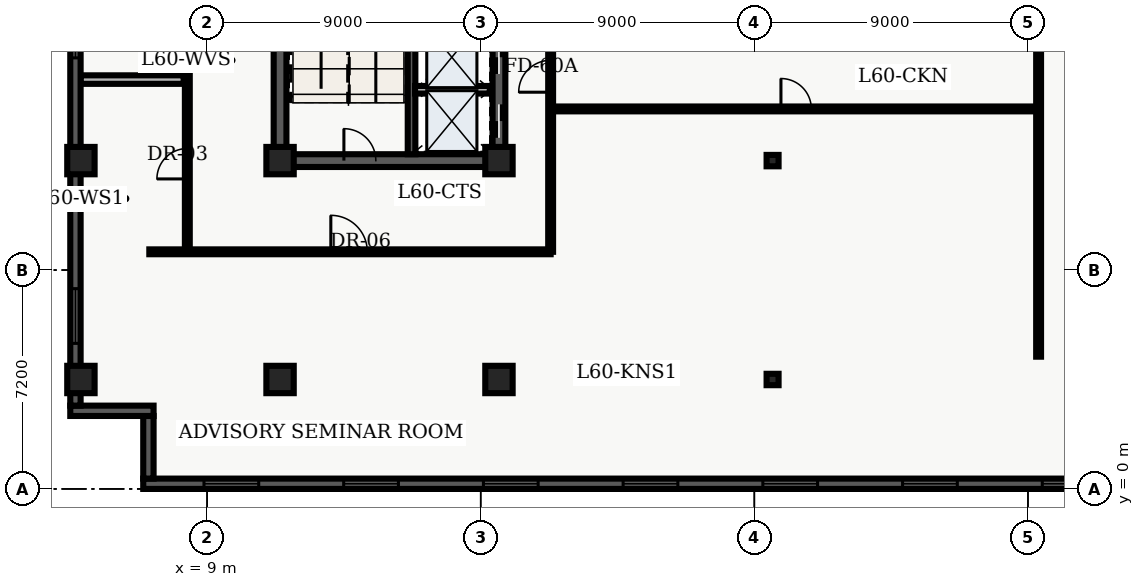
"""IFC4 building model, lengths in metres.
Left out: names, types, materials, properties, quantities, classifications, styles, units other than length and angle.
Written with IfcOpenShell. Run it as: python <this file> out.ifc"""

import sys

from ifc_helpers import new_model, entity, si_unit, converted_unit, direction, frame, origin_with_axes, origin_2d_with_axis, place, context, subcontext, project, spatial, polyline, rectangle, i_section, outline, extrude, element, fill, save


model = new_model("IFC4")
c1 = context("Model", 3, precision=1e-05, world=origin_with_axes(), true_north=direction((0.0, 1.0)))
c2 = subcontext(c1, "Body", "Model", "MODEL_VIEW")
j1 = project(units=[si_unit("LENGTHUNIT", "METRE"), converted_unit("PLANEANGLEUNIT", "DEGREE", entity("IfcPlaneAngleMeasure", 0.017), si_unit("PLANEANGLEUNIT", "RADIAN"), dimensions=[0, 0, 0, 0, 0, 0, 0])], contexts=[c1])
p1 = place(None, origin_with_axes())
s1 = spatial("IfcSite", under=j1, at=p1, CompositionType="ELEMENT")
p2 = place(p1, origin_with_axes())
s2 = spatial("IfcBuilding", under=s1, at=p2, CompositionType="ELEMENT")
p3 = place(p2, frame((0.0, 0.0, 244.2), z_axis=(0.0, 0.0, 1.0), x_axis=(1.0, 0.0, 0.0)))
s3 = spatial("IfcBuildingStorey", under=s2, at=p3, CompositionType="ELEMENT", Elevation=244.2)
p4 = place(p3, frame((11.4, 10.8, 0.0), z_axis=(0.0, 0.0, 1.0), x_axis=(0.0, 1.0, 0.0)))
e1 = element("IfcWall", 1, at=p4, inside=s3, PredefinedType="SHEAR", context=c2, shape_type="SweptSolid", body=[
    extrude(outline(polyline([(0.0, -0.21), (27.0, -0.21), (27.0, 0.21), (0.0, 0.21), (0.0, -0.21)])), origin_with_axes(), (0.0, 0.0, 1.0), 3.6),
])
p5 = place(p3, frame((11.4, 10.8, 0.0), z_axis=(0.0, 0.0, 1.0), x_axis=(1.0, 0.0, 0.0)))
e2 = element("IfcWall", 2, at=p5, inside=s3, PredefinedType="SHEAR", context=c2, shape_type="SweptSolid", body=[
    extrude(outline(polyline([(0.0, -0.21), (7.2, -0.21), (7.2, 0.21), (0.0, 0.21), (0.0, -0.21)])), origin_with_axes(), (0.0, 0.0, 1.0), 3.6),
])
p6 = place(p5, frame((2.625, 0.0, 0.0), z_axis=(0.0, 0.0, 1.0), x_axis=(1.0, 0.0, 0.0)))
e3 = element("IfcOpeningElement", 3, at=p6, cuts=e2, PredefinedType="OPENING", context=c2, shape_type="SweptSolid", body=[
    extrude(rectangle(XDim=1.05, YDim=0.44, at=origin_2d_with_axis()), origin_with_axes(), (0.0, 0.0, 1.0), 2.15),
])
p7 = place(p3, frame((18.6, 10.8, 0.0), z_axis=(0.0, 0.0, 1.0), x_axis=(0.0, 1.0, 0.0)))
e4 = element("IfcWall", 4, at=p7, inside=s3, PredefinedType="SHEAR", context=c2, shape_type="SweptSolid", body=[
    extrude(outline(polyline([(0.0, -0.21), (13.5, -0.21), (13.5, 0.21), (0.0, 0.21), (0.0, -0.21)])), origin_with_axes(), (0.0, 0.0, 1.0), 3.6),
])
p8 = place(p7, frame((1.3, 0.0, 0.0), z_axis=(0.0, 0.0, 1.0), x_axis=(1.0, 0.0, 0.0)))
e5 = element("IfcOpeningElement", 5, at=p8, cuts=e4, PredefinedType="OPENING", context=c2, shape_type="SweptSolid", body=[
    extrude(rectangle(XDim=1.1, YDim=0.44, at=origin_2d_with_axis()), origin_with_axes(), (0.0, 0.0, 1.0), 2.15),
])
p9 = place(p7, frame((3.4, 0.0, 0.0), z_axis=(0.0, 0.0, 1.0), x_axis=(1.0, 0.0, 0.0)))
e6 = element("IfcOpeningElement", 6, at=p9, cuts=e4, PredefinedType="OPENING", context=c2, shape_type="SweptSolid", body=[
    extrude(rectangle(XDim=1.1, YDim=0.44, at=origin_2d_with_axis()), origin_with_axes(), (0.0, 0.0, 1.0), 2.15),
])
p10 = place(p7, frame((11.125, 0.0, 0.0), z_axis=(0.0, 0.0, 1.0), x_axis=(1.0, 0.0, 0.0)))
e7 = element("IfcOpeningElement", 7, at=p10, cuts=e4, PredefinedType="OPENING", context=c2, shape_type="SweptSolid", body=[
    extrude(rectangle(XDim=1.05, YDim=0.44, at=origin_2d_with_axis()), origin_with_axes(), (0.0, 0.0, 1.0), 2.15),
])
p11 = place(p7, frame((6.675, 0.0, 0.0), z_axis=(0.0, 0.0, 1.0), x_axis=(1.0, 0.0, 0.0)))
e8 = element("IfcOpeningElement", 8, at=p11, cuts=e4, PredefinedType="OPENING", context=c2, shape_type="SweptSolid", body=[
    extrude(rectangle(XDim=0.95, YDim=0.44, at=origin_2d_with_axis()), origin_with_axes(), (0.0, 0.0, 1.0), 2.15),
])
p12 = place(p3, frame((15.725, 11.01, 0.0), z_axis=(0.0, 0.0, 1.0), x_axis=(0.0, 1.0, 0.0)))
e9 = element("IfcWall", 9, at=p12, inside=s3, PredefinedType="SHEAR", context=c2, shape_type="SweptSolid", body=[
    extrude(outline(polyline([(0.0, -0.125), (8.69, -0.125), (8.69, 0.125), (0.0, 0.125), (0.0, -0.125)])), origin_with_axes(), (0.0, 0.0, 1.0), 3.6),
])
for number, where, z_axis, x_axis in (
    (10, (11.4, 3.6, 0.0), (0.0, 0.0, 1.0), (1.0, 0.0, 0.0)),
    (11, (11.4, 10.8, 0.0), (0.0, 0.0, 1.0), (1.0, 0.0, 0.0)),
    (12, (18.6, 3.6, 0.0), (0.0, 0.0, 1.0), (1.0, 0.0, 0.0)),
    (13, (18.6, 10.8, 0.0), (0.0, 0.0, 1.0), (1.0, 0.0, 0.0)),
    (14, (4.85, 3.6, 0.0), (0.0, 0.0, 1.0), (1.0, 0.0, 0.0)),
    (15, (4.85, 10.8, 0.0), (0.0, 0.0, 1.0), (1.0, 0.0, 0.0)),
):
    element("IfcColumn", number, at=place(p3, frame(where, z_axis=z_axis, x_axis=x_axis)), inside=s3, PredefinedType="COLUMN", context=c2, shape_type="SweptSolid", body=[
        extrude(rectangle(XDim=0.9, YDim=0.9, at=origin_2d_with_axis()), origin_with_axes(), (0.0, 0.0, 1.0), 3.9),
    ])
for number, where, z_axis, x_axis in (
    (16, (27.6, 3.6, 0.0), (0.0, 0.0, 1.0), (1.0, 0.0, 0.0)),
    (17, (27.6, 10.8, 0.0), (0.0, 0.0, 1.0), (1.0, 0.0, 0.0)),
):
    element("IfcColumn", number, at=place(p3, frame(where, z_axis=z_axis, x_axis=x_axis)), inside=s3, PredefinedType="COLUMN", context=c2, shape_type="SweptSolid", body=[
        extrude(i_section(OverallWidth=0.394, OverallDepth=0.375, WebThickness=0.017, FlangeThickness=0.028, FilletRadius=0.02, at=origin_2d_with_axis()), origin_with_axes(), (0.0, 0.0, 1.0), 3.9),
    ])
p13 = place(p3, frame((15.84, 13.13, 0.0), z_axis=(0.0, 0.0, 1.0), x_axis=(1.0, 0.0, 0.0)))
e18 = element("IfcWall", 18, at=p13, inside=s3, PredefinedType="SOLIDWALL", context=c2, shape_type="SweptSolid", body=[
    extrude(outline(polyline([(0.0, -0.125), (2.46, -0.125), (2.46, 0.125), (0.0, 0.125), (0.0, -0.125)])), origin_with_axes(), (0.0, 0.0, 1.0), 2.64),
])
p14 = place(p3, frame((7.1, 7.8, 0.0), z_axis=(0.0, 0.0, 1.0), x_axis=(1.0, 0.0, 0.0)))
e19 = element("IfcWall", 19, at=p14, inside=s3, PredefinedType="PARTITIONING", context=c2, shape_type="SweptSolid", body=[
    extrude(outline(polyline([(0.0, -0.08), (13.2, -0.08), (13.2, 0.08), (0.0, 0.08), (0.0, -0.08)])), origin_with_axes(), (0.0, 0.0, 1.0), 2.64),
])
p15 = place(p14, frame((6.57, 0.0, 0.0), z_axis=(0.0, 0.0, 1.0), x_axis=(1.0, 0.0, 0.0)))
e20 = element("IfcOpeningElement", 20, at=p15, cuts=e19, PredefinedType="OPENING", context=c2, shape_type="SweptSolid", body=[
    extrude(rectangle(XDim=1.2, YDim=0.18, at=origin_2d_with_axis()), origin_with_axes(), (0.0, 0.0, 1.0), 2.2),
])
p16 = place(p3, frame((20.3, 7.8, 0.0), z_axis=(0.0, 0.0, 1.0), x_axis=(0.0, 1.0, 0.0)))
e21 = element("IfcWall", 21, at=p16, inside=s3, PredefinedType="PARTITIONING", context=c2, shape_type="SweptSolid", body=[
    extrude(outline(polyline([(0.0, -0.08), (32.7, -0.08), (32.7, 0.08), (0.0, 0.08), (0.0, -0.08)])), origin_with_axes(), (0.0, 0.0, 1.0), 2.64),
])
p17 = place(p16, frame((17.794, 0.0, 0.0), z_axis=(0.0, 0.0, 1.0), x_axis=(1.0, 0.0, 0.0)))
e22 = element("IfcOpeningElement", 22, at=p17, cuts=e21, PredefinedType="OPENING", context=c2, shape_type="SweptSolid", body=[
    extrude(rectangle(XDim=1.0, YDim=0.18, at=origin_2d_with_axis()), origin_with_axes(), (0.0, 0.0, 1.0), 2.15),
])
p18 = place(p16, frame((22.145, 0.0, 0.0), z_axis=(0.0, 0.0, 1.0), x_axis=(1.0, 0.0, 0.0)))
e23 = element("IfcOpeningElement", 23, at=p18, cuts=e21, PredefinedType="OPENING", context=c2, shape_type="SweptSolid", body=[
    extrude(rectangle(XDim=1.0, YDim=0.18, at=origin_2d_with_axis()), origin_with_axes(), (0.0, 0.0, 1.0), 2.15),
])
p19 = place(p16, frame((26.855, 0.0, 0.0), z_axis=(0.0, 0.0, 1.0), x_axis=(1.0, 0.0, 0.0)))
e24 = element("IfcOpeningElement", 24, at=p19, cuts=e21, PredefinedType="OPENING", context=c2, shape_type="SweptSolid", body=[
    extrude(rectangle(XDim=1.0, YDim=0.18, at=origin_2d_with_axis()), origin_with_axes(), (0.0, 0.0, 1.0), 2.15),
])
p20 = place(p16, frame((5.775, 0.0, 0.0), z_axis=(0.0, 0.0, 1.0), x_axis=(1.0, 0.0, 0.0)))
e25 = element("IfcOpeningElement", 25, at=p20, cuts=e21, PredefinedType="OPENING", context=c2, shape_type="SweptSolid", body=[
    extrude(rectangle(XDim=1.05, YDim=0.18, at=origin_2d_with_axis()), origin_with_axes(), (0.0, 0.0, 1.0), 2.15),
])
p21 = place(p3, frame((8.35, 7.8, 0.0), z_axis=(0.0, 0.0, 1.0), x_axis=(0.0, 1.0, 0.0)))
e26 = element("IfcWall", 26, at=p21, inside=s3, PredefinedType="PARTITIONING", context=c2, shape_type="SweptSolid", body=[
    extrude(outline(polyline([(0.0, -0.08), (12.6, -0.08), (12.6, 0.08), (0.0, 0.08), (0.0, -0.08)])), origin_with_axes(), (0.0, 0.0, 1.0), 2.64),
])
p22 = place(p21, frame((2.897, 0.0, 0.0), z_axis=(0.0, 0.0, 1.0), x_axis=(1.0, 0.0, 0.0)))
e27 = element("IfcOpeningElement", 27, at=p22, cuts=e26, PredefinedType="OPENING", context=c2, shape_type="SweptSolid", body=[
    extrude(rectangle(XDim=1.0, YDim=0.18, at=origin_2d_with_axis()), origin_with_axes(), (0.0, 0.0, 1.0), 2.15),
])
p23 = place(p21, frame((9.092, 0.0, 0.0), z_axis=(0.0, 0.0, 1.0), x_axis=(1.0, 0.0, 0.0)))
e28 = element("IfcOpeningElement", 28, at=p23, cuts=e26, PredefinedType="OPENING", context=c2, shape_type="SweptSolid", body=[
    extrude(rectangle(XDim=1.0, YDim=0.18, at=origin_2d_with_axis()), origin_with_axes(), (0.0, 0.0, 1.0), 2.15),
])
p24 = place(p3, frame((4.835, 13.465, 0.0), z_axis=(0.0, 0.0, 1.0), x_axis=(1.0, 0.0, 0.0)))
e29 = element("IfcWall", 29, at=p24, inside=s3, PredefinedType="PARTITIONING", context=c2, shape_type="SweptSolid", body=[
    extrude(outline(polyline([(0.0, -0.14), (3.395, -0.14), (3.395, 0.14), (0.0, 0.14), (0.0, -0.14)])), origin_with_axes(), (0.0, 0.0, 1.0), 2.64),
])
p25 = place(p3, frame((20.3, 12.5, 0.0), z_axis=(0.0, 0.0, 1.0), x_axis=(1.0, 0.0, 0.0)))
e30 = element("IfcWall", 30, at=p25, inside=s3, PredefinedType="PARTITIONING", context=c2, shape_type="SweptSolid", body=[
    extrude(outline(polyline([(0.0, -0.08), (16.05, -0.08), (16.05, 0.08), (0.0, 0.08), (0.0, -0.08)])), origin_with_axes(), (0.0, 0.0, 1.0), 2.64),
])
p26 = place(p25, frame((8.075, 0.0, 0.0), z_axis=(0.0, 0.0, 1.0), x_axis=(1.0, 0.0, 0.0)))
e31 = element("IfcOpeningElement", 31, at=p26, cuts=e30, PredefinedType="OPENING", context=c2, shape_type="SweptSolid", body=[
    extrude(rectangle(XDim=1.0, YDim=0.18, at=origin_2d_with_axis()), origin_with_axes(), (0.0, 0.0, 1.0), 2.15),
])
p27 = place(p3, frame((36.35, 4.35, 0.0), z_axis=(0.0, 0.0, 1.0), x_axis=(0.0, 1.0, 0.0)))
e32 = element("IfcWall", 32, at=p27, inside=s3, PredefinedType="PARTITIONING", context=c2, shape_type="SweptSolid", body=[
    extrude(outline(polyline([(0.0, -0.08), (16.95, -0.08), (16.95, 0.08), (0.0, 0.08), (0.0, -0.08)])), origin_with_axes(), (0.0, 0.0, 1.0), 2.64),
])
p28 = place(p3, frame((49.46, 0.17, 0.0), z_axis=(0.0, 0.0, 1.0), x_axis=(-1.0, 0.0, 0.0)))
e33 = element("IfcWall", 33, at=p28, inside=s3, PredefinedType="SOLIDWALL", context=c2, shape_type="SweptSolid", body=[
    extrude(outline(polyline([(0.0, -0.17), (42.56, -0.17), (42.56, 0.17), (0.0, 0.17), (0.0, -0.17)])), origin_with_axes(), (0.0, 0.0, 1.0), 3.6),
])
p29 = place(p28, frame((2.898, 0.0, 0.45), z_axis=(0.0, 0.0, 1.0), x_axis=(1.0, 0.0, 0.0)))
e34 = element("IfcOpeningElement", 34, at=p29, cuts=e33, PredefinedType="OPENING", context=c2, shape_type="SweptSolid", body=[
    extrude(rectangle(XDim=1.8, YDim=0.36, at=origin_2d_with_axis()), origin_with_axes(), (0.0, 0.0, 1.0), 2.1),
])
p30 = place(p28, frame((7.493, 0.0, 0.45), z_axis=(0.0, 0.0, 1.0), x_axis=(1.0, 0.0, 0.0)))
e35 = element("IfcOpeningElement", 35, at=p30, cuts=e33, PredefinedType="OPENING", context=c2, shape_type="SweptSolid", body=[
    extrude(rectangle(XDim=1.8, YDim=0.36, at=origin_2d_with_axis()), origin_with_axes(), (0.0, 0.0, 1.0), 2.1),
])
p31 = place(p28, frame((12.089, 0.0, 0.45), z_axis=(0.0, 0.0, 1.0), x_axis=(1.0, 0.0, 0.0)))
e36 = element("IfcOpeningElement", 36, at=p31, cuts=e33, PredefinedType="OPENING", context=c2, shape_type="SweptSolid", body=[
    extrude(rectangle(XDim=1.8, YDim=0.36, at=origin_2d_with_axis()), origin_with_axes(), (0.0, 0.0, 1.0), 2.1),
])
p32 = place(p28, frame((16.684, 0.0, 0.45), z_axis=(0.0, 0.0, 1.0), x_axis=(1.0, 0.0, 0.0)))
e37 = element("IfcOpeningElement", 37, at=p32, cuts=e33, PredefinedType="OPENING", context=c2, shape_type="SweptSolid", body=[
    extrude(rectangle(XDim=1.8, YDim=0.36, at=origin_2d_with_axis()), origin_with_axes(), (0.0, 0.0, 1.0), 2.1),
])
p33 = place(p28, frame((21.28, 0.0, 0.45), z_axis=(0.0, 0.0, 1.0), x_axis=(1.0, 0.0, 0.0)))
e38 = element("IfcOpeningElement", 38, at=p33, cuts=e33, PredefinedType="OPENING", context=c2, shape_type="SweptSolid", body=[
    extrude(rectangle(XDim=1.8, YDim=0.36, at=origin_2d_with_axis()), origin_with_axes(), (0.0, 0.0, 1.0), 2.1),
])
p34 = place(p28, frame((25.876, 0.0, 0.45), z_axis=(0.0, 0.0, 1.0), x_axis=(1.0, 0.0, 0.0)))
e39 = element("IfcOpeningElement", 39, at=p34, cuts=e33, PredefinedType="OPENING", context=c2, shape_type="SweptSolid", body=[
    extrude(rectangle(XDim=1.8, YDim=0.36, at=origin_2d_with_axis()), origin_with_axes(), (0.0, 0.0, 1.0), 2.1),
])
p35 = place(p28, frame((30.471, 0.0, 0.45), z_axis=(0.0, 0.0, 1.0), x_axis=(1.0, 0.0, 0.0)))
e40 = element("IfcOpeningElement", 40, at=p35, cuts=e33, PredefinedType="OPENING", context=c2, shape_type="SweptSolid", body=[
    extrude(rectangle(XDim=1.8, YDim=0.36, at=origin_2d_with_axis()), origin_with_axes(), (0.0, 0.0, 1.0), 2.1),
])
p36 = place(p28, frame((35.067, 0.0, 0.45), z_axis=(0.0, 0.0, 1.0), x_axis=(1.0, 0.0, 0.0)))
e41 = element("IfcOpeningElement", 41, at=p36, cuts=e33, PredefinedType="OPENING", context=c2, shape_type="SweptSolid", body=[
    extrude(rectangle(XDim=1.8, YDim=0.36, at=origin_2d_with_axis()), origin_with_axes(), (0.0, 0.0, 1.0), 2.1),
])
p37 = place(p28, frame((39.662, 0.0, 0.45), z_axis=(0.0, 0.0, 1.0), x_axis=(1.0, 0.0, 0.0)))
e42 = element("IfcOpeningElement", 42, at=p37, cuts=e33, PredefinedType="OPENING", context=c2, shape_type="SweptSolid", body=[
    extrude(rectangle(XDim=1.8, YDim=0.36, at=origin_2d_with_axis()), origin_with_axes(), (0.0, 0.0, 1.0), 2.1),
])
p38 = place(p3, frame((7.07, 0.34, 0.0), z_axis=(0.0, 0.0, 1.0), x_axis=(0.0, 1.0, 0.0)))
e43 = element("IfcWall", 43, at=p38, inside=s3, PredefinedType="SOLIDWALL", context=c2, shape_type="SweptSolid", body=[
    extrude(outline(polyline([(0.0, -0.17), (2.06, -0.17), (2.06, 0.17), (0.0, 0.17), (0.0, -0.17)])), origin_with_axes(), (0.0, 0.0, 1.0), 3.6),
])
p39 = place(p3, frame((7.24, 2.57, 0.0), z_axis=(0.0, 0.0, 1.0), x_axis=(-1.0, 0.0, 0.0)))
e44 = element("IfcWall", 44, at=p39, inside=s3, PredefinedType="SOLIDWALL", context=c2, shape_type="SweptSolid", body=[
    extrude(outline(polyline([(0.0, -0.17), (2.74, -0.17), (2.74, 0.17), (0.0, 0.17), (0.0, -0.17)])), origin_with_axes(), (0.0, 0.0, 1.0), 3.6),
])
p40 = place(p3, frame((4.67, 2.74, 0.0), z_axis=(0.0, 0.0, 1.0), x_axis=(0.0, 1.0, 0.0)))
e45 = element("IfcWall", 45, at=p40, inside=s3, PredefinedType="SOLIDWALL", context=c2, shape_type="SweptSolid", body=[
    extrude(outline(polyline([(0.0, -0.17), (43.46, -0.17), (43.46, 0.17), (0.0, 0.17), (0.0, -0.17)])), origin_with_axes(), (0.0, 0.0, 1.0), 3.6),
])
p41 = place(p40, frame((2.948, 0.0, 0.45), z_axis=(0.0, 0.0, 1.0), x_axis=(1.0, 0.0, 0.0)))
e46 = element("IfcOpeningElement", 46, at=p41, cuts=e45, PredefinedType="OPENING", context=c2, shape_type="SweptSolid", body=[
    extrude(rectangle(XDim=1.8, YDim=0.36, at=origin_2d_with_axis()), origin_with_axes(), (0.0, 0.0, 1.0), 2.1),
])
p42 = place(p40, frame((12.339, 0.0, 0.45), z_axis=(0.0, 0.0, 1.0), x_axis=(1.0, 0.0, 0.0)))
e47 = element("IfcOpeningElement", 47, at=p42, cuts=e45, PredefinedType="OPENING", context=c2, shape_type="SweptSolid", body=[
    extrude(rectangle(XDim=1.8, YDim=0.36, at=origin_2d_with_axis()), origin_with_axes(), (0.0, 0.0, 1.0), 2.1),
])
p43 = place(p40, frame((16.184, 0.0, 0.45), z_axis=(0.0, 0.0, 1.0), x_axis=(1.0, 0.0, 0.0)))
e48 = element("IfcOpeningElement", 48, at=p43, cuts=e45, PredefinedType="OPENING", context=c2, shape_type="SweptSolid", body=[
    extrude(rectangle(XDim=1.8, YDim=0.36, at=origin_2d_with_axis()), origin_with_axes(), (0.0, 0.0, 1.0), 2.1),
])
p44 = place(p40, frame((40.062, 0.0, 0.45), z_axis=(0.0, 0.0, 1.0), x_axis=(1.0, 0.0, 0.0)))
e49 = element("IfcOpeningElement", 49, at=p44, cuts=e45, PredefinedType="OPENING", context=c2, shape_type="SweptSolid", body=[
    extrude(rectangle(XDim=1.8, YDim=0.36, at=origin_2d_with_axis()), origin_with_axes(), (0.0, 0.0, 1.0), 2.1),
])
p45 = place(p7, frame((1.3, 0.0, 0.0), z_axis=(0.0, 0.0, 1.0), x_axis=(1.0, 0.0, 0.0)))
e50 = element("IfcDoor", 50, at=p45, inside=s3, OperationType="SLIDING_TO_LEFT", PredefinedType="DOOR", context=c2, shape_type="SweptSolid", body=[
    extrude(rectangle(XDim=1.1, YDim=0.09, at=origin_2d_with_axis()), origin_with_axes(), (0.0, 0.0, 1.0), 2.15),
])
fill(e5, e50)
p46 = place(p7, frame((3.4, 0.0, 0.0), z_axis=(0.0, 0.0, 1.0), x_axis=(1.0, 0.0, 0.0)))
e51 = element("IfcDoor", 51, at=p46, inside=s3, OperationType="SLIDING_TO_RIGHT", PredefinedType="DOOR", context=c2, shape_type="SweptSolid", body=[
    extrude(rectangle(XDim=1.1, YDim=0.09, at=origin_2d_with_axis()), origin_with_axes(), (0.0, 0.0, 1.0), 2.15),
])
fill(e6, e51)
p47 = place(p5, frame((2.625, 0.0, 0.0), z_axis=(0.0, 0.0, 1.0), x_axis=(1.0, 0.0, 0.0)))
e52 = element("IfcDoor", 52, at=p47, inside=s3, OperationType="SINGLE_SWING_LEFT", PredefinedType="DOOR", context=c2, shape_type="SweptSolid", body=[
    extrude(rectangle(XDim=1.05, YDim=0.09, at=origin_2d_with_axis()), origin_with_axes(), (0.0, 0.0, 1.0), 2.15),
])
fill(e3, e52)
p48 = place(p21, frame((2.897, 0.0, 0.0), z_axis=(0.0, 0.0, 1.0), x_axis=(1.0, 0.0, 0.0)))
e53 = element("IfcDoor", 53, at=p48, inside=s3, OperationType="SINGLE_SWING_LEFT", PredefinedType="DOOR", context=c2, shape_type="SweptSolid", body=[
    extrude(rectangle(XDim=1.0, YDim=0.09, at=origin_2d_with_axis()), origin_with_axes(), (0.0, 0.0, 1.0), 2.15),
])
fill(e27, e53)
p49 = place(p14, frame((6.57, 0.0, 0.0), z_axis=(0.0, 0.0, 1.0), x_axis=(1.0, 0.0, 0.0)))
e54 = element("IfcDoor", 54, at=p49, inside=s3, OperationType="SINGLE_SWING_LEFT", PredefinedType="DOOR", context=c2, shape_type="SweptSolid", body=[
    extrude(rectangle(XDim=1.2, YDim=0.09, at=origin_2d_with_axis()), origin_with_axes(), (0.0, 0.0, 1.0), 2.2),
])
fill(e20, e54)
p50 = place(p16, frame((5.775, 0.0, 0.0), z_axis=(0.0, 0.0, 1.0), x_axis=(1.0, 0.0, 0.0)))
e55 = element("IfcDoor", 55, at=p50, inside=s3, OperationType="SINGLE_SWING_LEFT", PredefinedType="DOOR", context=c2, shape_type="SweptSolid", body=[
    extrude(rectangle(XDim=1.05, YDim=0.09, at=origin_2d_with_axis()), origin_with_axes(), (0.0, 0.0, 1.0), 2.15),
])
fill(e25, e55)
p51 = place(p25, frame((8.075, 0.0, 0.0), z_axis=(0.0, 0.0, 1.0), x_axis=(1.0, 0.0, 0.0)))
e56 = element("IfcDoor", 56, at=p51, inside=s3, OperationType="SINGLE_SWING_LEFT", PredefinedType="DOOR", context=c2, shape_type="SweptSolid", body=[
    extrude(rectangle(XDim=1.0, YDim=0.09, at=origin_2d_with_axis()), origin_with_axes(), (0.0, 0.0, 1.0), 2.15),
])
fill(e31, e56)
p52 = place(p28, frame((12.089, 0.0, 0.45), z_axis=(0.0, 0.0, 1.0), x_axis=(1.0, 0.0, 0.0)))
e57 = element("IfcWindow", 57, at=p52, inside=s3, PredefinedType="WINDOW", context=c2, shape_type="SweptSolid", body=[
    extrude(rectangle(XDim=1.8, YDim=0.09, at=origin_2d_with_axis()), origin_with_axes(), (0.0, 0.0, 1.0), 2.1),
])
fill(e36, e57)
p53 = place(p28, frame((16.684, 0.0, 0.45), z_axis=(0.0, 0.0, 1.0), x_axis=(1.0, 0.0, 0.0)))
e58 = element("IfcWindow", 58, at=p53, inside=s3, PredefinedType="WINDOW", context=c2, shape_type="SweptSolid", body=[
    extrude(rectangle(XDim=1.8, YDim=0.09, at=origin_2d_with_axis()), origin_with_axes(), (0.0, 0.0, 1.0), 2.1),
])
fill(e37, e58)
p54 = place(p28, frame((21.28, 0.0, 0.45), z_axis=(0.0, 0.0, 1.0), x_axis=(1.0, 0.0, 0.0)))
e59 = element("IfcWindow", 59, at=p54, inside=s3, PredefinedType="WINDOW", context=c2, shape_type="SweptSolid", body=[
    extrude(rectangle(XDim=1.8, YDim=0.09, at=origin_2d_with_axis()), origin_with_axes(), (0.0, 0.0, 1.0), 2.1),
])
fill(e38, e59)
p55 = place(p28, frame((25.876, 0.0, 0.45), z_axis=(0.0, 0.0, 1.0), x_axis=(1.0, 0.0, 0.0)))
e60 = element("IfcWindow", 60, at=p55, inside=s3, PredefinedType="WINDOW", context=c2, shape_type="SweptSolid", body=[
    extrude(rectangle(XDim=1.8, YDim=0.09, at=origin_2d_with_axis()), origin_with_axes(), (0.0, 0.0, 1.0), 2.1),
])
fill(e39, e60)
p56 = place(p28, frame((30.471, 0.0, 0.45), z_axis=(0.0, 0.0, 1.0), x_axis=(1.0, 0.0, 0.0)))
e61 = element("IfcWindow", 61, at=p56, inside=s3, PredefinedType="WINDOW", context=c2, shape_type="SweptSolid", body=[
    extrude(rectangle(XDim=1.8, YDim=0.09, at=origin_2d_with_axis()), origin_with_axes(), (0.0, 0.0, 1.0), 2.1),
])
fill(e40, e61)
p57 = place(p28, frame((35.067, 0.0, 0.45), z_axis=(0.0, 0.0, 1.0), x_axis=(1.0, 0.0, 0.0)))
e62 = element("IfcWindow", 62, at=p57, inside=s3, PredefinedType="WINDOW", context=c2, shape_type="SweptSolid", body=[
    extrude(rectangle(XDim=1.8, YDim=0.09, at=origin_2d_with_axis()), origin_with_axes(), (0.0, 0.0, 1.0), 2.1),
])
fill(e41, e62)
p58 = place(p28, frame((39.662, 0.0, 0.45), z_axis=(0.0, 0.0, 1.0), x_axis=(1.0, 0.0, 0.0)))
e63 = element("IfcWindow", 63, at=p58, inside=s3, PredefinedType="WINDOW", context=c2, shape_type="SweptSolid", body=[
    extrude(rectangle(XDim=1.8, YDim=0.09, at=origin_2d_with_axis()), origin_with_axes(), (0.0, 0.0, 1.0), 2.1),
])
fill(e42, e63)
p59 = place(p40, frame((2.948, 0.0, 0.45), z_axis=(0.0, 0.0, 1.0), x_axis=(1.0, 0.0, 0.0)))
e64 = element("IfcWindow", 64, at=p59, inside=s3, PredefinedType="WINDOW", context=c2, shape_type="SweptSolid", body=[
    extrude(rectangle(XDim=1.8, YDim=0.09, at=origin_2d_with_axis()), origin_with_axes(), (0.0, 0.0, 1.0), 2.1),
])
fill(e46, e64)
p60 = place(p40, frame((12.339, 0.0, 0.45), z_axis=(0.0, 0.0, 1.0), x_axis=(1.0, 0.0, 0.0)))
e65 = element("IfcWindow", 65, at=p60, inside=s3, PredefinedType="WINDOW", context=c2, shape_type="SweptSolid", body=[
    extrude(rectangle(XDim=1.8, YDim=0.09, at=origin_2d_with_axis()), origin_with_axes(), (0.0, 0.0, 1.0), 2.1),
])
fill(e47, e65)
save(model, sys.argv[1])
